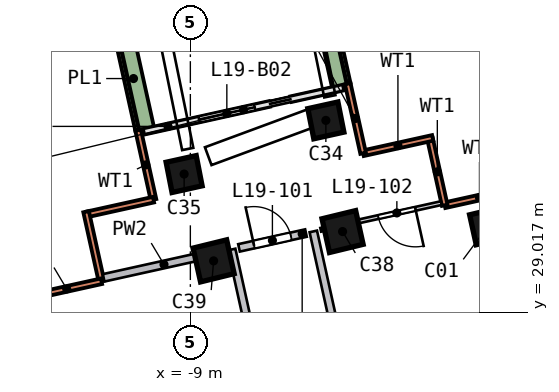
"""IFC4 building model, lengths in metres.
Left out: names, types, materials, properties, quantities, classifications, styles, units other than length and angle.
Written with IfcOpenShell. Run it as: python <this file> out.ifc"""

import sys

from ifc_helpers import new_model, si_unit, direction, frame, frame_2d, origin, origin_2d, place, context, subcontext, project, spatial, rectangle, extrude, element, fill, save


model = new_model("IFC4")
c1 = context("Model", 3, precision=1e-05, world=origin(), true_north=direction((0.0, 1.0)))
c2 = subcontext(c1, "Body", "Model", "MODEL_VIEW")
j1 = project(units=[si_unit("LENGTHUNIT", "METRE"), si_unit("PLANEANGLEUNIT", "RADIAN")], contexts=[c1])
p1 = place(None, origin())
s1 = spatial("IfcSite", under=j1, at=p1, CompositionType="ELEMENT")
p2 = place(p1, origin())
s2 = spatial("IfcBuilding", under=s1, at=p2, CompositionType="ELEMENT")
p3 = place(p2, frame((0.0, 0.0, 86.0)))
s3 = spatial("IfcBuildingStorey", under=s2, at=p3, CompositionType="ELEMENT", Elevation=86.0)
p4 = place(p3, frame((-1.032, 31.457, 0.0), z_axis=(-0.113741466, -0.149149418, 0.982251154), x_axis=(-0.231567603, 0.965416786, 0.119778442)))
e1 = element("IfcColumn", 1, at=p4, inside=s3, PredefinedType="COLUMN", context=c2, shape_type="SweptSolid", body=[
    extrude(rectangle(XDim=0.8, YDim=0.8, at=origin_2d()), origin(), (0.0, 0.0, 1.0), 3.248),
])
p5 = place(p3, frame((-11.838, 28.635, 0.0), z_axis=(-0.099256798, -0.198289708, 0.975104753), x_axis=(0.236719045, -0.956516188, -0.170413836)))
e2 = element("IfcColumn", 2, at=p5, inside=s3, PredefinedType="COLUMN", context=c2, shape_type="SweptSolid", body=[
    extrude(rectangle(XDim=0.8, YDim=0.8, at=origin_2d()), origin(), (0.0, 0.0, 1.0), 3.271),
])
p6 = place(p3, frame((-5.28, 34.266, 0.0), z_axis=(-0.126148017, -0.168421819, 0.977609722), x_axis=(-0.968631183, -0.191781936, -0.15802949)))
e3 = element("IfcColumn", 3, at=p6, inside=s3, PredefinedType="COLUMN", context=c2, shape_type="SweptSolid", body=[
    extrude(rectangle(XDim=0.8, YDim=0.8, at=origin_2d()), origin(), (0.0, 0.0, 1.0), 3.263),
])
p7 = place(p3, frame((-9.017, 32.875, 0.0), z_axis=(-0.119218609, -0.18543458, 0.975397837), x_axis=(-0.969641606, -0.189504375, -0.154542057)))
e4 = element("IfcColumn", 4, at=p7, inside=s3, PredefinedType="COLUMN", context=c2, shape_type="SweptSolid", body=[
    extrude(rectangle(XDim=0.8, YDim=0.8, at=origin_2d()), origin(), (0.0, 0.0, 1.0), 3.271),
])
p8 = place(p3, frame((-4.857, 31.338, 0.0), z_axis=(-0.112680998, -0.166584949, 0.97956748), x_axis=(-0.233848081, 0.962601108, 0.136799786)))
e5 = element("IfcColumn", 5, at=p8, inside=s3, PredefinedType="COLUMN", context=c2, shape_type="SweptSolid", body=[
    extrude(rectangle(XDim=0.9, YDim=0.9, at=origin_2d()), origin(), (0.0, 0.0, 1.0), 3.257),
])
p9 = place(p3, frame((-8.255, 30.586, 0.0), z_axis=(-0.108748867, -0.182120696, 0.977243949), x_axis=(-0.235828864, 0.959736177, 0.152614605)))
e6 = element("IfcColumn", 6, at=p9, inside=s3, PredefinedType="COLUMN", context=c2, shape_type="SweptSolid", body=[
    extrude(rectangle(XDim=0.9, YDim=0.9, at=origin_2d()), origin(), (0.0, 0.0, 1.0), 3.264),
])
p10 = place(p3, frame((-0.476, 32.231, 0.0), z_axis=(0.0, 0.0, 1.0), x_axis=(-0.976358333, -0.216158287, 0.0)))
e7 = element("IfcWall", 7, at=p10, inside=s3, PredefinedType="SOLIDWALL", context=c2, shape_type="SweptSolid", body=[
    extrude(rectangle(XDim=1.875, YDim=0.15, at=frame_2d((0.938, 0.0))), origin(), (0.0, 0.0, 1.0), 3.19),
])
p11 = place(p3, frame((-2.307, 31.825, 0.0), z_axis=(0.0, 0.0, 1.0), x_axis=(-0.216183668, 0.976352714, 0.0)))
e8 = element("IfcWall", 8, at=p11, inside=s3, PredefinedType="SOLIDWALL", context=c2, shape_type="SweptSolid", body=[
    extrude(rectangle(XDim=1.8, YDim=0.15, at=frame_2d((0.9, 0.0))), origin(), (0.0, 0.0, 1.0), 3.19),
])
p12 = place(p3, frame((-2.623, 33.599, 0.0), z_axis=(0.0, 0.0, 1.0), x_axis=(-0.976358333, -0.216158287, 0.0)))
e9 = element("IfcWall", 9, at=p12, inside=s3, PredefinedType="SOLIDWALL", context=c2, shape_type="SweptSolid", body=[
    extrude(rectangle(XDim=1.875, YDim=0.15, at=frame_2d((0.938, 0.0))), origin(), (0.0, 0.0, 1.0), 3.19),
])
p13 = place(p3, frame((-4.453, 33.194, 0.0), z_axis=(0.0, 0.0, 1.0), x_axis=(-0.216130808, 0.976364416, 0.0)))
e10 = element("IfcWall", 10, at=p13, inside=s3, PredefinedType="SOLIDWALL", context=c2, shape_type="SweptSolid", body=[
    extrude(rectangle(XDim=1.875, YDim=0.15, at=frame_2d((0.938, 0.0))), origin(), (0.0, 0.0, 1.0), 3.19),
])
p14 = place(p3, frame((-10.375, 33.804, 0.0), z_axis=(0.0, 0.0, 1.0), x_axis=(0.216006686, -0.976391884, 0.0)))
e11 = element("IfcWall", 11, at=p14, inside=s3, PredefinedType="SOLIDWALL", context=c2, shape_type="SweptSolid", body=[
    extrude(rectangle(XDim=1.875, YDim=0.15, at=frame_2d((0.938, 0.0))), origin(), (0.0, 0.0, 1.0), 3.19),
])
p15 = place(p3, frame((-9.97, 31.973, 0.0), z_axis=(0.0, 0.0, 1.0), x_axis=(-0.976375, -0.216082992, 0.0)))
e12 = element("IfcWall", 12, at=p15, inside=s3, PredefinedType="SOLIDWALL", context=c2, shape_type="SweptSolid", body=[
    extrude(rectangle(XDim=1.8, YDim=0.15, at=frame_2d((0.9, 0.0))), origin(), (0.0, 0.0, 1.0), 3.19),
])
p16 = place(p3, frame((-11.744, 31.657, 0.0), z_axis=(0.0, 0.0, 1.0), x_axis=(0.216158287, -0.976358333, 0.0)))
e13 = element("IfcWall", 13, at=p16, inside=s3, PredefinedType="SOLIDWALL", context=c2, shape_type="SweptSolid", body=[
    extrude(rectangle(XDim=1.875, YDim=0.15, at=frame_2d((0.938, 0.0))), origin(), (0.0, 0.0, 1.0), 3.19),
])
p17 = place(p3, frame((-11.338, 29.827, 0.0), z_axis=(0.0, 0.0, 1.0), x_axis=(-0.976364416, -0.216130808, 0.0)))
e14 = element("IfcWall", 14, at=p17, inside=s3, PredefinedType="SOLIDWALL", context=c2, shape_type="SweptSolid", body=[
    extrude(rectangle(XDim=1.875, YDim=0.15, at=frame_2d((0.938, 0.0))), origin(), (0.0, 0.0, 1.0), 3.19),
])
p18 = place(p3, frame((-6.917, 34.492, 0.0), z_axis=(0.0, 0.0, 1.0), x_axis=(-0.976369111, -0.216109598, 0.0)))
e15 = element("IfcWall", 15, at=p18, inside=s3, PredefinedType="SOLIDWALL", context=c2, shape_type="SweptSolid", body=[
    extrude(rectangle(XDim=3.37, YDim=0.15, at=frame_2d((1.685, 0.0))), origin(), (0.0, 0.0, 1.0), 2.425),
])
p19 = place(p18, frame((0.4, 0.0, 0.0)))
e16 = element("IfcOpeningElement", 16, at=p19, cuts=e15, PredefinedType="OPENING", context=c2, shape_type="SweptSolid", body=[
    extrude(rectangle(XDim=1.5, YDim=2.4, at=frame_2d((0.75, 1.2))), frame((0.0, 0.085, 0.0), z_axis=(0.0, -1.0, 0.0), x_axis=(1.0, 0.0, 0.0)), (0.0, 0.0, 1.0), 0.17),
])
p20 = place(p3, frame((-4.994, 34.918, 0.0), z_axis=(0.0, 0.0, 1.0), x_axis=(-0.976372571, -0.216093965, 0.0)))
e17 = element("IfcWall", 17, at=p20, inside=s3, PredefinedType="SOLIDWALL", context=c2, shape_type="SweptSolid", body=[
    extrude(rectangle(XDim=1.391, YDim=0.15, at=frame_2d((0.695, 0.0))), origin(), (0.0, 0.0, 1.0), 2.425),
])
p21 = place(p3, frame((-13.064, 29.296, 0.0), z_axis=(0.0, 0.0, 1.0), x_axis=(0.216101776, -0.976370843, 0.0)))
e18 = element("IfcWall", 18, at=p21, inside=s3, PredefinedType="SOLIDWALL", context=c2, shape_type="SweptSolid", body=[
    extrude(rectangle(XDim=4.773, YDim=0.15, at=frame_2d((2.387, 0.0))), origin(), (0.0, 0.0, 1.0), 2.425),
])
p22 = place(p21, frame((1.973, 0.0, 0.0)))
e19 = element("IfcOpeningElement", 19, at=p22, cuts=e18, PredefinedType="OPENING", context=c2, shape_type="SweptSolid", body=[
    extrude(rectangle(XDim=2.4, YDim=2.4, at=frame_2d((1.2, 1.2))), frame((0.0, 0.085, 0.0), z_axis=(0.0, -1.0, 0.0), x_axis=(1.0, 0.0, 0.0)), (0.0, 0.0, 1.0), 0.17),
])
p23 = place(p3, frame((-5.03, 34.988, 0.0), z_axis=(0.0, 0.0, 1.0), x_axis=(-0.216049597, 0.97638239, 0.0)))
e20 = element("IfcWall", 20, at=p23, inside=s3, PredefinedType="SOLIDWALL", context=c2, shape_type="SweptSolid", body=[
    extrude(rectangle(XDim=3.199, YDim=0.5, at=frame_2d((1.6, 0.0))), origin(), (0.0, 0.0, 1.0), 0.7),
])
p24 = place(p3, frame((-10.788, 36.478, 0.0), z_axis=(0.0, 0.0, 1.0), x_axis=(0.216097128, -0.976371871, 0.0)))
e21 = element("IfcWall", 21, at=p24, inside=s3, PredefinedType="SOLIDWALL", context=c2, shape_type="SweptSolid", body=[
    extrude(rectangle(XDim=2.699, YDim=0.5, at=frame_2d((1.35, 0.0))), origin(), (0.0, 0.0, 1.0), 0.7),
])
p25 = place(p3, frame((-7.719, 30.704, 0.0), z_axis=(0.0, 0.0, 1.0), x_axis=(0.976361891, 0.216142215, 0.0)))
e22 = element("IfcWall", 22, at=p25, inside=s3, PredefinedType="SOLIDWALL", context=c2, shape_type="SweptSolid", body=[
    extrude(rectangle(XDim=1.804, YDim=0.2, at=frame_2d((0.902, 0.0))), origin(), (0.0, 0.0, 1.0), 3.19),
])
p26 = place(p25, frame((0.4, 0.0, 0.0)))
e23 = element("IfcOpeningElement", 23, at=p26, cuts=e22, PredefinedType="OPENING", context=c2, shape_type="SweptSolid", body=[
    extrude(rectangle(XDim=1.0, YDim=2.1, at=frame_2d((0.5, 1.05))), frame((0.0, 0.11, 0.0), z_axis=(0.0, -1.0, 0.0), x_axis=(1.0, 0.0, 0.0)), (0.0, 0.0, 1.0), 0.22),
])
p27 = place(p3, frame((-4.955, 17.296, 0.0), z_axis=(0.0, 0.0, 1.0), x_axis=(-0.216091911, 0.976373026, 0.0)))
e24 = element("IfcWall", 24, at=p27, inside=s3, PredefinedType="SOLIDWALL", context=c2, shape_type="SweptSolid", body=[
    extrude(rectangle(XDim=13.689, YDim=0.2, at=frame_2d((6.844, 0.0))), origin(), (0.0, 0.0, 1.0), 3.19),
])
p28 = place(p27, frame((7.65, 0.0, 0.0)))
e25 = element("IfcOpeningElement", 25, at=p28, cuts=e24, PredefinedType="OPENING", context=c2, shape_type="SweptSolid", body=[
    extrude(rectangle(XDim=1.0, YDim=2.1, at=frame_2d((0.5, 1.05))), frame((0.0, 0.11, 0.0), z_axis=(0.0, -1.0, 0.0), x_axis=(1.0, 0.0, 0.0)), (0.0, 0.0, 1.0), 0.22),
])
p29 = place(p3, frame((-2.807, 17.772, 0.0), z_axis=(0.0, 0.0, 1.0), x_axis=(-0.216091911, 0.976373026, 0.0)))
e26 = element("IfcWall", 26, at=p29, inside=s3, PredefinedType="SOLIDWALL", context=c2, shape_type="SweptSolid", body=[
    extrude(rectangle(XDim=13.689, YDim=0.2, at=frame_2d((6.844, 0.0))), origin(), (0.0, 0.0, 1.0), 3.19),
])
p30 = place(p3, frame((-8.106, 30.619, 0.0), z_axis=(0.0, 0.0, 1.0), x_axis=(-0.976365133, -0.216127573, 0.0)))
e27 = element("IfcWall", 27, at=p30, inside=s3, PredefinedType="SOLIDWALL", context=c2, shape_type="SweptSolid", body=[
    extrude(rectangle(XDim=3.252, YDim=0.2, at=frame_2d((1.626, 0.0))), origin(), (0.0, 0.0, 1.0), 3.19),
])
p31 = place(p3, frame((-2.394, 31.883, 0.0), z_axis=(0.0, 0.0, 1.0), x_axis=(-0.976380972, -0.216056008, 0.0)))
e28 = element("IfcWall", 28, at=p31, inside=s3, PredefinedType="PARTITIONING", context=c2, shape_type="SweptSolid", body=[
    extrude(rectangle(XDim=3.252, YDim=0.1, at=frame_2d((1.626, 0.0))), origin(), (0.0, 0.0, 1.0), 3.19),
])
p32 = place(p31, frame((0.7, 0.0, 0.0)))
e29 = element("IfcOpeningElement", 29, at=p32, cuts=e28, PredefinedType="OPENING", context=c2, shape_type="SweptSolid", body=[
    extrude(rectangle(XDim=1.0, YDim=2.1, at=frame_2d((0.5, 1.05))), frame((0.0, 0.06, 0.0), z_axis=(0.0, -1.0, 0.0), x_axis=(1.0, 0.0, 0.0)), (0.0, 0.0, 1.0), 0.12),
])
p33 = place(p19, origin())
e30 = element("IfcDoor", 30, at=p33, inside=s3, OperationType="SLIDING_TO_RIGHT", PredefinedType="DOOR", context=c2, shape_type="SweptSolid", body=[
    extrude(rectangle(XDim=1.5, YDim=2.4, at=frame_2d((0.75, 1.2))), frame((0.0, 0.025, 0.0), z_axis=(0.0, -1.0, 0.0), x_axis=(1.0, 0.0, 0.0)), (0.0, 0.0, 1.0), 0.05),
])
fill(e16, e30)
p34 = place(p26, origin())
e31 = element("IfcDoor", 31, at=p34, inside=s3, OperationType="SINGLE_SWING_LEFT", PredefinedType="DOOR", context=c2, shape_type="SweptSolid", body=[
    extrude(rectangle(XDim=1.0, YDim=2.1, at=frame_2d((0.5, 1.05))), frame((0.0, 0.025, 0.0), z_axis=(0.0, -1.0, 0.0), x_axis=(1.0, 0.0, 0.0)), (0.0, 0.0, 1.0), 0.05),
])
fill(e23, e31)
p35 = place(p32, origin())
e32 = element("IfcDoor", 32, at=p35, inside=s3, OperationType="SINGLE_SWING_LEFT", PredefinedType="DOOR", context=c2, shape_type="SweptSolid", body=[
    extrude(rectangle(XDim=1.0, YDim=2.1, at=frame_2d((0.5, 1.05))), frame((0.0, 0.025, 0.0), z_axis=(0.0, -1.0, 0.0), x_axis=(1.0, 0.0, 0.0)), (0.0, 0.0, 1.0), 0.05),
])
fill(e29, e32)
save(model, sys.argv[1])
